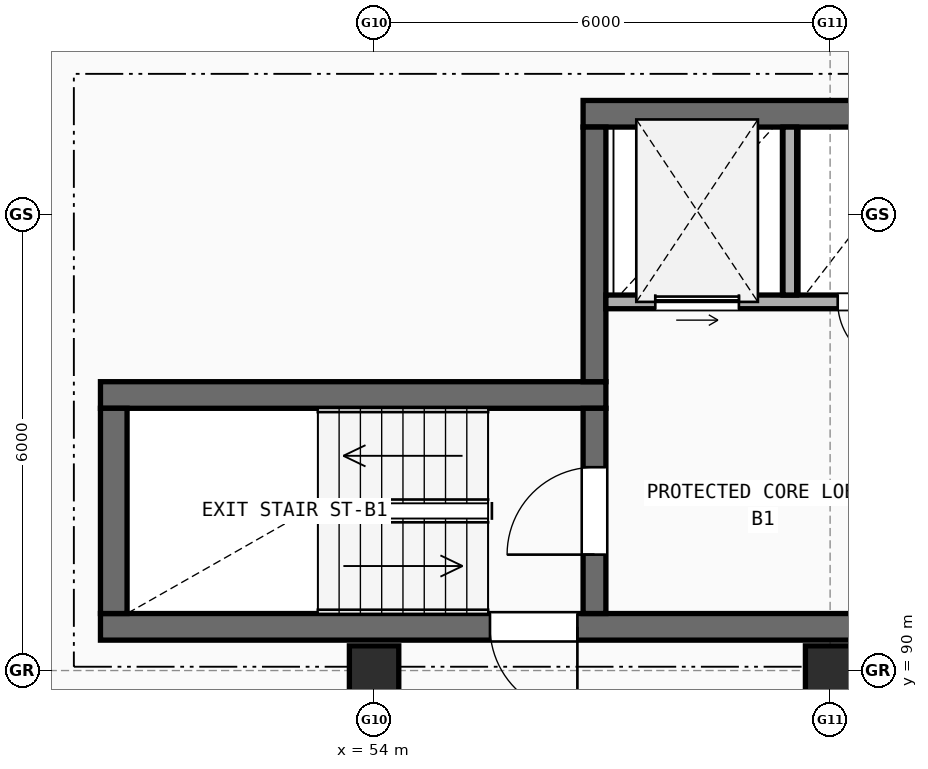
"""IFC4 building model, lengths in metres.
Left out: names, types, materials, properties, quantities, classifications, styles, units other than length and angle.
Written with IfcOpenShell. Run it as: python <this file> out.ifc"""

import sys

from ifc_helpers import new_model, si_unit, direction, frame, frame_2d, origin, origin_2d, place, context, subcontext, project, spatial, rectangle, extrude, element, fill, save


model = new_model("IFC4")
c1 = context("Model", 3, precision=1e-05, world=origin(), true_north=direction((0.0, 1.0)))
c2 = subcontext(c1, "Body", "Model", "MODEL_VIEW")
j1 = project(units=[si_unit("LENGTHUNIT", "METRE"), si_unit("PLANEANGLEUNIT", "RADIAN")], contexts=[c1])
p1 = place(None, origin())
s1 = spatial("IfcSite", under=j1, at=p1, CompositionType="ELEMENT")
p2 = place(p1, origin())
s2 = spatial("IfcBuilding", under=s1, at=p2, CompositionType="ELEMENT")
p3 = place(p2, frame((0.0, 0.0, 14.1)))
s3 = spatial("IfcBuildingStorey", under=s2, at=p3, CompositionType="ELEMENT", Elevation=14.1)
for number, where, z_axis, x_axis in (
    (1, (54.0, 90.0, 0.0), (0.0, 0.0, 1.0), (1.0, 0.0, 0.0)),
    (2, (60.0, 90.0, 0.0), (0.0, 0.0, 1.0), (1.0, 0.0, 0.0)),
):
    element("IfcColumn", number, at=place(p3, frame(where, z_axis=z_axis, x_axis=x_axis)), inside=s3, PredefinedType="COLUMN", context=c2, shape_type="SweptSolid", body=[
        extrude(rectangle(XDim=0.65, YDim=0.65, at=origin_2d()), origin(), (0.0, 0.0, 1.0), 2.95),
    ])
p4 = place(p3, frame((50.4, 90.575, 0.0), z_axis=(0.0, 0.0, 1.0), x_axis=(1.0, 0.0, 0.0)))
e3 = element("IfcWall", 3, at=p4, inside=s3, PredefinedType="SHEAR", context=c2, shape_type="SweptSolid", body=[
    extrude(rectangle(XDim=11.4, YDim=0.35, at=frame_2d((5.7, 0.0))), origin(), (0.0, 0.0, 1.0), 2.95),
])
p5 = place(p4, frame((5.125, 0.0, 0.0)))
e4 = element("IfcOpeningElement", 4, at=p5, cuts=e3, PredefinedType="OPENING", context=c2, shape_type="SweptSolid", body=[
    extrude(rectangle(XDim=1.15, YDim=2.15, at=frame_2d((0.575, 1.075))), frame((0.0, 0.185, 0.0), z_axis=(0.0, -1.0, 0.0), x_axis=(1.0, 0.0, 0.0)), (0.0, 0.0, 1.0), 0.37),
])
p6 = place(p3, frame((57.05, 93.625, 0.0), z_axis=(0.0, 0.0, 1.0), x_axis=(-1.0, 0.0, 0.0)))
e5 = element("IfcWall", 5, at=p6, inside=s3, PredefinedType="SHEAR", context=c2, shape_type="SweptSolid", body=[
    extrude(rectangle(XDim=6.65, YDim=0.35, at=frame_2d((3.325, 0.0))), origin(), (0.0, 0.0, 1.0), 2.95),
])
p7 = place(p3, frame((50.575, 93.45, 0.0), z_axis=(0.0, 0.0, 1.0), x_axis=(0.0, -1.0, 0.0)))
e6 = element("IfcWall", 6, at=p7, inside=s3, PredefinedType="SHEAR", context=c2, shape_type="SweptSolid", body=[
    extrude(rectangle(XDim=2.7, YDim=0.35, at=frame_2d((1.35, 0.0))), origin(), (0.0, 0.0, 1.0), 2.95),
])
p8 = place(p3, frame((56.9, 90.75, 0.0), z_axis=(0.0, 0.0, 1.0), x_axis=(0.0, 1.0, 0.0)))
e7 = element("IfcWall", 7, at=p8, inside=s3, PredefinedType="SHEAR", context=c2, shape_type="SweptSolid", body=[
    extrude(rectangle(XDim=2.7, YDim=0.3, at=frame_2d((1.35, 0.0))), origin(), (0.0, 0.0, 1.0), 2.95),
])
p9 = place(p8, frame((0.775, 0.0, 0.0)))
e8 = element("IfcOpeningElement", 8, at=p9, cuts=e7, PredefinedType="OPENING", context=c2, shape_type="SweptSolid", body=[
    extrude(rectangle(XDim=1.15, YDim=2.15, at=frame_2d((0.575, 1.075))), frame((0.0, 0.16, 0.0), z_axis=(0.0, -1.0, 0.0), x_axis=(1.0, 0.0, 0.0)), (0.0, 0.0, 1.0), 0.32),
])
p10 = place(p3, frame((61.8, 97.325, 0.0), z_axis=(0.0, 0.0, 1.0), x_axis=(-1.0, 0.0, 0.0)))
e9 = element("IfcWall", 9, at=p10, inside=s3, PredefinedType="SHEAR", context=c2, shape_type="SweptSolid", body=[
    extrude(rectangle(XDim=5.05, YDim=0.35, at=frame_2d((2.525, 0.0))), origin(), (0.0, 0.0, 1.0), 2.95),
])
p11 = place(p3, frame((56.9, 93.8, 0.0), z_axis=(0.0, 0.0, 1.0), x_axis=(0.0, 1.0, 0.0)))
e10 = element("IfcWall", 10, at=p11, inside=s3, PredefinedType="SHEAR", context=c2, shape_type="SweptSolid", body=[
    extrude(rectangle(XDim=3.35, YDim=0.3, at=frame_2d((1.675, 0.0))), origin(), (0.0, 0.0, 1.0), 2.95),
])
p12 = place(p3, frame((57.05, 94.85, 0.0), z_axis=(0.0, 0.0, 1.0), x_axis=(1.0, 0.0, 0.0)))
e11 = element("IfcWall", 11, at=p12, inside=s3, PredefinedType="SOLIDWALL", context=c2, shape_type="SweptSolid", body=[
    extrude(rectangle(XDim=4.4, YDim=0.18, at=frame_2d((2.2, 0.0))), origin(), (0.0, 0.0, 1.0), 2.95),
])
p13 = place(p12, frame((0.65, 0.0, 0.0)))
e12 = element("IfcOpeningElement", 12, at=p13, cuts=e11, PredefinedType="OPENING", context=c2, shape_type="SweptSolid", body=[
    extrude(rectangle(XDim=1.1, YDim=2.15, at=frame_2d((0.55, 1.075))), frame((0.0, 0.1, 0.0), z_axis=(0.0, -1.0, 0.0), x_axis=(1.0, 0.0, 0.0)), (0.0, 0.0, 1.0), 0.2),
])
p14 = place(p12, frame((3.05, 0.0, 0.0)))
e13 = element("IfcOpeningElement", 13, at=p14, cuts=e11, PredefinedType="OPENING", context=c2, shape_type="SweptSolid", body=[
    extrude(rectangle(XDim=0.85, YDim=2.1, at=frame_2d((0.425, 1.05))), frame((0.0, 0.1, 0.0), z_axis=(0.0, -1.0, 0.0), x_axis=(1.0, 0.0, 0.0)), (0.0, 0.0, 1.0), 0.2),
])
p15 = place(p3, frame((59.47, 94.94, 0.0), z_axis=(0.0, 0.0, 1.0), x_axis=(0.0, 1.0, 0.0)))
e14 = element("IfcWall", 14, at=p15, inside=s3, PredefinedType="SOLIDWALL", context=c2, shape_type="SweptSolid", body=[
    extrude(rectangle(XDim=2.21, YDim=0.18, at=frame_2d((1.105, 0.0))), origin(), (0.0, 0.0, 1.0), 2.95),
])
p16 = place(p5, origin())
e15 = element("IfcDoor", 15, at=p16, inside=s3, OperationType="SINGLE_SWING_RIGHT", PredefinedType="DOOR", context=c2, shape_type="SweptSolid", body=[
    extrude(rectangle(XDim=1.15, YDim=2.15, at=frame_2d((0.575, 1.075))), frame((0.0, 0.025, 0.0), z_axis=(0.0, -1.0, 0.0), x_axis=(1.0, 0.0, 0.0)), (0.0, 0.0, 1.0), 0.05),
])
fill(e4, e15)
p17 = place(p9, origin())
e16 = element("IfcDoor", 16, at=p17, inside=s3, OperationType="SINGLE_SWING_LEFT", PredefinedType="DOOR", context=c2, shape_type="SweptSolid", body=[
    extrude(rectangle(XDim=1.15, YDim=2.15, at=frame_2d((0.575, 1.075))), frame((0.0, 0.025, 0.0), z_axis=(0.0, -1.0, 0.0), x_axis=(1.0, 0.0, 0.0)), (0.0, 0.0, 1.0), 0.05),
])
fill(e8, e16)
p18 = place(p13, origin())
e17 = element("IfcDoor", 17, at=p18, inside=s3, OperationType="SLIDING_TO_LEFT", PredefinedType="DOOR", context=c2, shape_type="SweptSolid", body=[
    extrude(rectangle(XDim=1.1, YDim=2.15, at=frame_2d((0.55, 1.075))), frame((0.0, 0.025, 0.0), z_axis=(0.0, -1.0, 0.0), x_axis=(1.0, 0.0, 0.0)), (0.0, 0.0, 1.0), 0.05),
])
fill(e12, e17)
p19 = place(p14, frame((0.85, 0.0, 0.0), z_axis=(0.0, 0.0, 1.0), x_axis=(-1.0, 0.0, 0.0)))
e18 = element("IfcDoor", 18, at=p19, inside=s3, OperationType="SINGLE_SWING_RIGHT", PredefinedType="DOOR", context=c2, shape_type="SweptSolid", body=[
    extrude(rectangle(XDim=0.85, YDim=2.1, at=frame_2d((0.425, 1.05))), frame((0.0, 0.025, 0.0), z_axis=(0.0, -1.0, 0.0), x_axis=(1.0, 0.0, 0.0)), (0.0, 0.0, 1.0), 0.05),
])
fill(e13, e18)
save(model, sys.argv[1])
